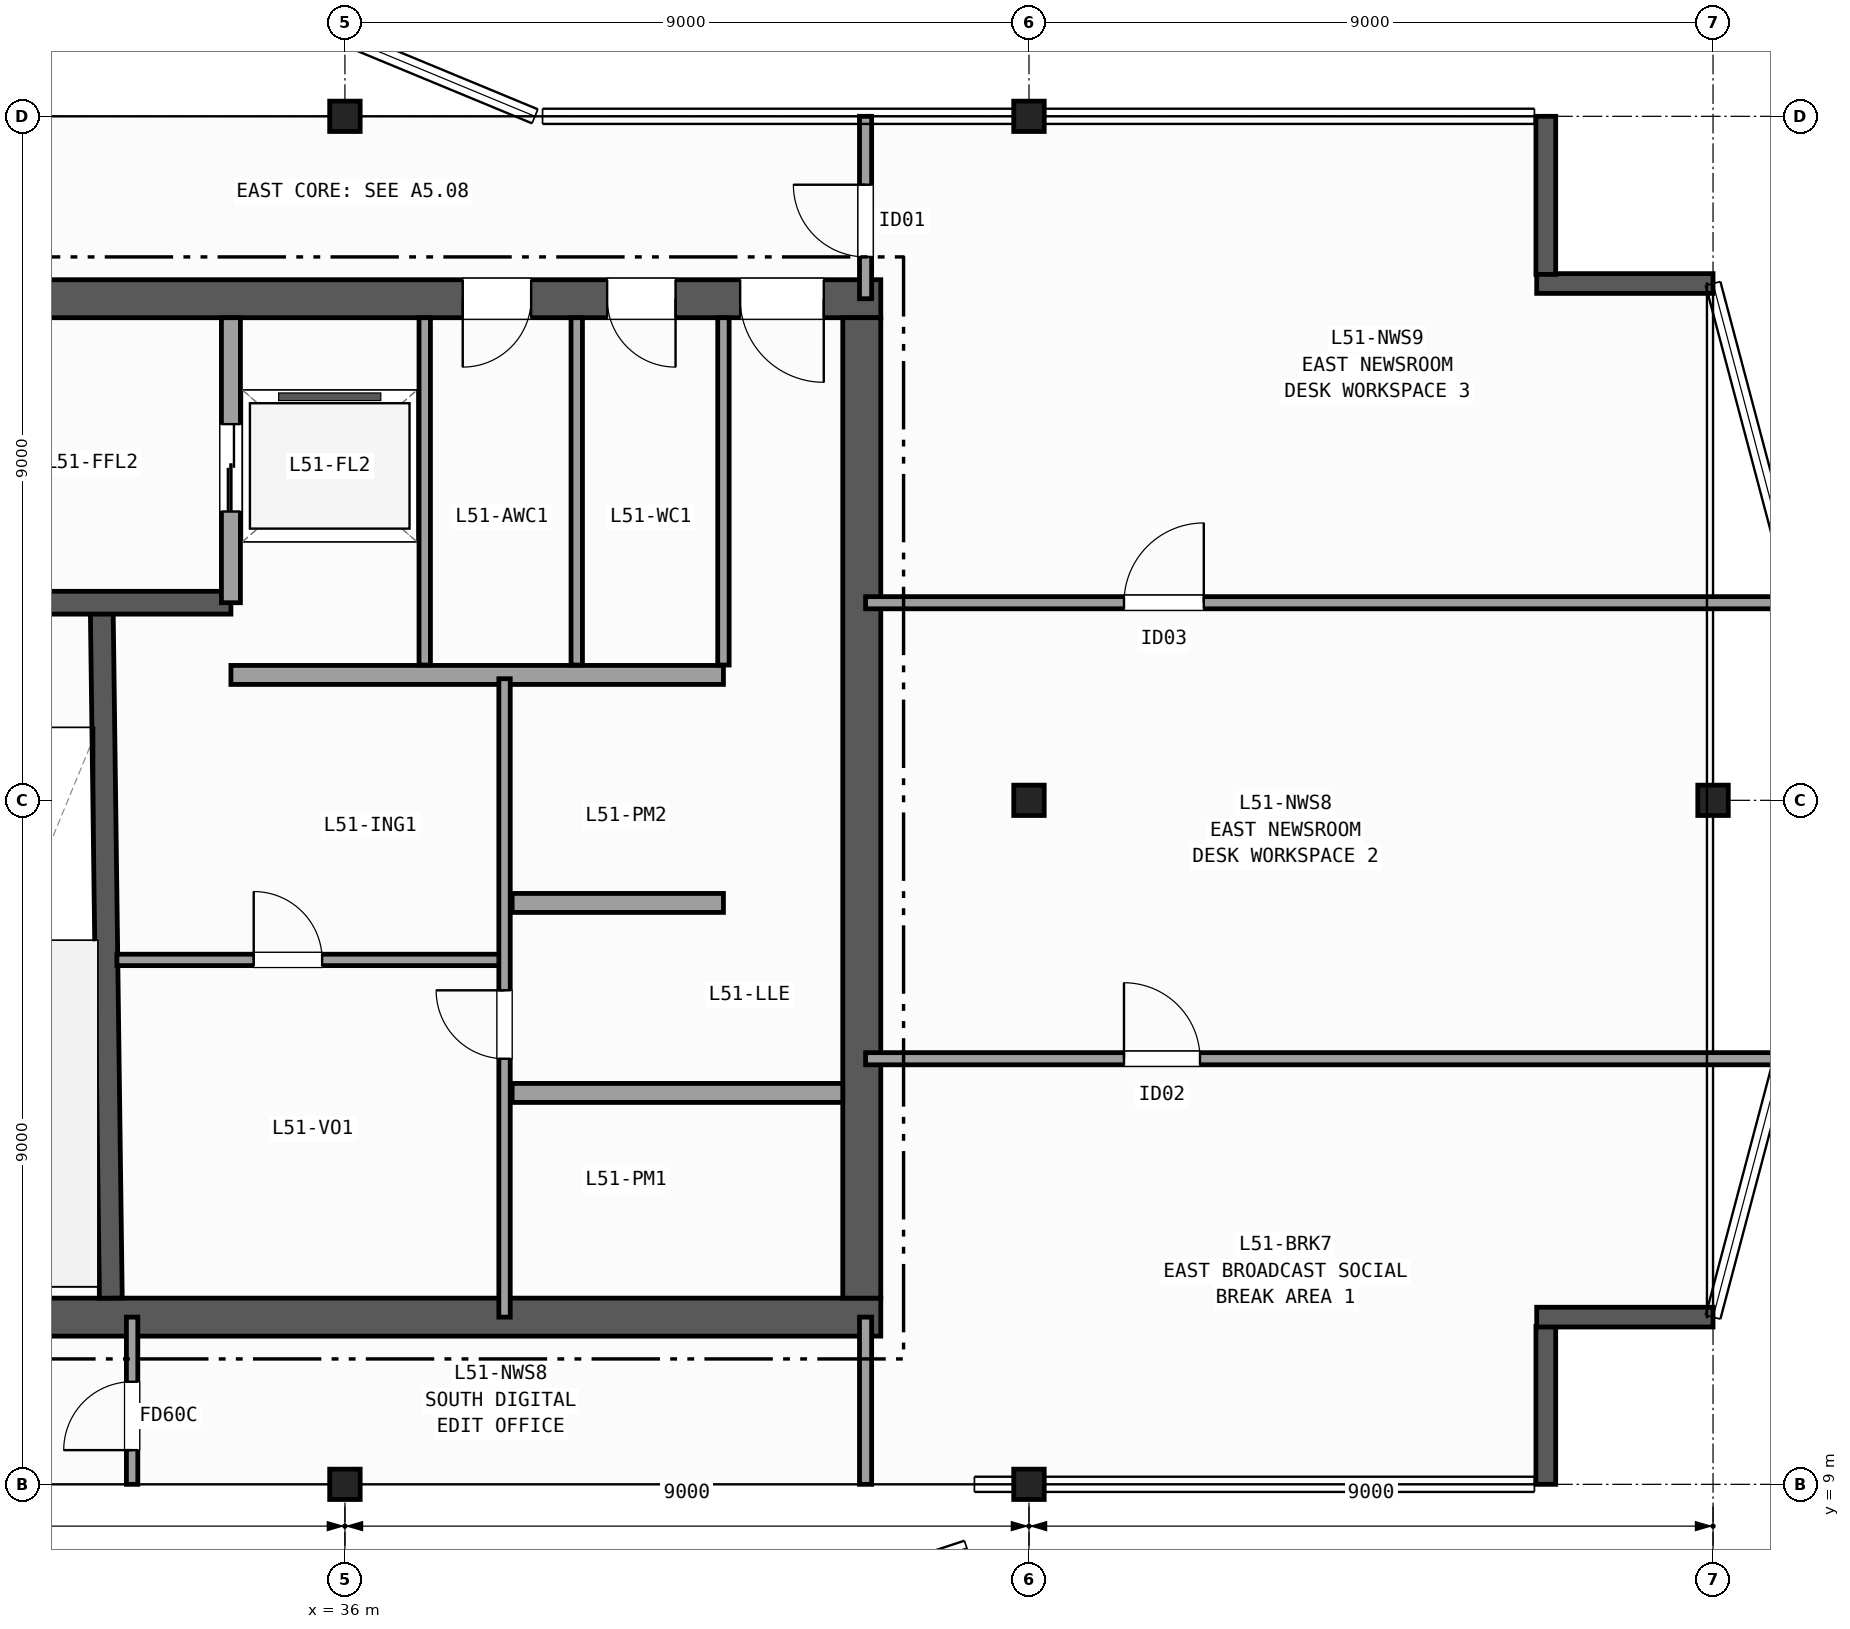
"""IFC4 building model, lengths in metres.
Left out: names, types, materials, properties, quantities, classifications, styles, units other than length and angle.
Written with IfcOpenShell. Run it as: python <this file> out.ifc"""

import sys

from ifc_helpers import new_model, si_unit, direction, frame, frame_2d, origin, origin_2d, place, context, subcontext, project, spatial, rectangle, i_section, extrude, element, fill, save


model = new_model("IFC4")
c1 = context("Model", 3, precision=1e-05, world=origin(), true_north=direction((0.0, 1.0)))
c2 = subcontext(c1, "Body", "Model", "MODEL_VIEW")
j1 = project(units=[si_unit("LENGTHUNIT", "METRE"), si_unit("PLANEANGLEUNIT", "RADIAN")], contexts=[c1])
p1 = place(None, origin())
s1 = spatial("IfcSite", under=j1, at=p1, CompositionType="ELEMENT")
p2 = place(p1, origin())
s2 = spatial("IfcBuilding", under=s1, at=p2, CompositionType="ELEMENT")
p3 = place(p2, frame((0.0, 0.0, 206.2)))
s3 = spatial("IfcBuildingStorey", under=s2, at=p3, CompositionType="ELEMENT", Elevation=206.2)
for number, where, z_axis, x_axis in (
    (1, (36.0, 9.0, 0.0), (0.0, 0.0, 1.0), (1.0, 0.0, 0.0)),
    (2, (36.0, 27.0, 0.0), (0.0, 0.0, 1.0), (1.0, 0.0, 0.0)),
    (3, (45.0, 9.0, 0.0), (0.0, 0.0, 1.0), (1.0, 0.0, 0.0)),
    (4, (45.0, 18.0, 0.0), (0.0, 0.0, 1.0), (1.0, 0.0, 0.0)),
    (5, (45.0, 27.0, 0.0), (0.0, 0.0, 1.0), (1.0, 0.0, 0.0)),
    (6, (54.0, 18.0, 0.0), (0.0, 0.0, 1.0), (1.0, 0.0, 0.0)),
):
    element("IfcColumn", number, at=place(p3, frame(where, z_axis=z_axis, x_axis=x_axis)), inside=s3, PredefinedType="COLUMN", context=c2, shape_type="SweptSolid", body=[
        extrude(i_section(OverallWidth=0.401, OverallDepth=0.399, WebThickness=0.025, FlangeThickness=0.04, FilletRadius=0.015, at=origin_2d()), origin(), (0.0, 0.0, 1.0), 3.7),
    ])
p4 = place(p3, frame((51.8, 9.0, 0.0), z_axis=(0.0, 0.0, 1.0), x_axis=(0.0, 1.0, 0.0)))
e7 = element("IfcWall", 7, at=p4, inside=s3, PredefinedType="SOLIDWALL", context=c2, shape_type="SweptSolid", body=[
    extrude(rectangle(XDim=2.08, YDim=0.26, at=frame_2d((1.04, 0.0))), origin(), (0.0, 0.0, 1.0), 3.42),
])
for number, where, z_axis, x_axis in (
    (8, (51.68, 11.2, 0.0), (0.0, 0.0, 1.0), (1.0, 0.0, 0.0)),
    (9, (54.0, 24.8, 0.0), (0.0, 0.0, 1.0), (-1.0, 0.0, 0.0)),
):
    element("IfcWall", number, at=place(p3, frame(where, z_axis=z_axis, x_axis=x_axis)), inside=s3, PredefinedType="SOLIDWALL", context=c2, shape_type="SweptSolid", body=[
        extrude(rectangle(XDim=2.32, YDim=0.26, at=frame_2d((1.16, 0.0))), origin(), (0.0, 0.0, 1.0), 3.42),
    ])
p5 = place(p3, frame((51.8, 24.92, 0.0), z_axis=(0.0, 0.0, 1.0), x_axis=(0.0, 1.0, 0.0)))
e10 = element("IfcWall", 10, at=p5, inside=s3, PredefinedType="SOLIDWALL", context=c2, shape_type="SweptSolid", body=[
    extrude(rectangle(XDim=2.08, YDim=0.26, at=frame_2d((1.04, 0.0))), origin(), (0.0, 0.0, 1.0), 3.42),
])
p6 = place(p3, frame((29.15, 11.2, 0.0), z_axis=(0.0, 0.0, 1.0), x_axis=(1.0, 0.0, 0.0)))
e11 = element("IfcWall", 11, at=p6, inside=s3, PredefinedType="SHEAR", context=c2, shape_type="SweptSolid", body=[
    extrude(rectangle(XDim=13.9, YDim=0.5, at=frame_2d((6.95, 0.0))), origin(), (0.0, 0.0, 1.0), 3.42),
])
p7 = place(p3, frame((43.05, 24.6, 0.0), z_axis=(0.0, 0.0, 1.0), x_axis=(-1.0, 0.0, 0.0)))
e12 = element("IfcWall", 12, at=p7, inside=s3, PredefinedType="SHEAR", context=c2, shape_type="SweptSolid", body=[
    extrude(rectangle(XDim=13.9, YDim=0.5, at=frame_2d((6.95, 0.0))), origin(), (0.0, 0.0, 1.0), 3.42),
])
p8 = place(p7, frame((0.75, 0.0, 0.0)))
e13 = element("IfcOpeningElement", 13, at=p8, cuts=e12, PredefinedType="OPENING", context=c2, shape_type="SweptSolid", body=[
    extrude(rectangle(XDim=1.1, YDim=2.15, at=frame_2d((0.55, 1.075))), frame((0.0, 0.26, 0.0), z_axis=(0.0, -1.0, 0.0), x_axis=(1.0, 0.0, 0.0)), (0.0, 0.0, 1.0), 0.52),
])
p9 = place(p7, frame((2.7, 0.0, 0.0)))
e14 = element("IfcOpeningElement", 14, at=p9, cuts=e12, PredefinedType="OPENING", context=c2, shape_type="SweptSolid", body=[
    extrude(rectangle(XDim=0.9, YDim=2.1, at=frame_2d((0.45, 1.05))), frame((0.0, 0.26, 0.0), z_axis=(0.0, -1.0, 0.0), x_axis=(1.0, 0.0, 0.0)), (0.0, 0.0, 1.0), 0.52),
])
p10 = place(p7, frame((4.6, 0.0, 0.0)))
e15 = element("IfcOpeningElement", 15, at=p10, cuts=e12, PredefinedType="OPENING", context=c2, shape_type="SweptSolid", body=[
    extrude(rectangle(XDim=0.9, YDim=2.1, at=frame_2d((0.45, 1.05))), frame((0.0, 0.26, 0.0), z_axis=(0.0, -1.0, 0.0), x_axis=(1.0, 0.0, 0.0)), (0.0, 0.0, 1.0), 0.52),
])
p11 = place(p3, frame((42.8, 11.45, 0.0), z_axis=(0.0, 0.0, 1.0), x_axis=(0.0, 1.0, 0.0)))
e16 = element("IfcWall", 16, at=p11, inside=s3, PredefinedType="SHEAR", context=c2, shape_type="SweptSolid", body=[
    extrude(rectangle(XDim=12.9, YDim=0.5, at=frame_2d((6.45, 0.0))), origin(), (0.0, 0.0, 1.0), 3.42),
])
p12 = place(p3, frame((32.92, 11.45, 0.0), z_axis=(0.0, 0.0, 1.0), x_axis=(-0.013171578211, 0.999913251001, 0.0)))
e17 = element("IfcWall", 17, at=p12, inside=s3, PredefinedType="SHEAR", context=c2, shape_type="SweptSolid", body=[
    extrude(rectangle(XDim=9.101, YDim=0.3, at=frame_2d((4.55, 0.0))), origin(), (0.0, 0.0, 1.0), 3.42),
])
p13 = place(p3, frame((34.5, 20.6, 0.0), z_axis=(0.0, 0.0, 1.0), x_axis=(-1.0, 0.0, 0.0)))
e18 = element("IfcWall", 18, at=p13, inside=s3, PredefinedType="SHEAR", context=c2, shape_type="SweptSolid", body=[
    extrude(rectangle(XDim=4.85, YDim=0.3, at=frame_2d((2.425, 0.0))), origin(), (0.0, 0.0, 1.0), 3.42),
])
p14 = place(p13, frame((2.7, 0.0, 0.0)))
e19 = element("IfcOpeningElement", 19, at=p14, cuts=e18, PredefinedType="OPENING", context=c2, shape_type="SweptSolid", body=[
    extrude(rectangle(XDim=1.2, YDim=2.15, at=frame_2d((0.6, 1.075))), frame((0.0, 0.16, 0.0), z_axis=(0.0, -1.0, 0.0), x_axis=(1.0, 0.0, 0.0)), (0.0, 0.0, 1.0), 0.32),
])
p15 = place(p3, frame((34.5, 20.6, 0.0), z_axis=(0.0, 0.0, 1.0), x_axis=(0.0, 1.0, 0.0)))
e20 = element("IfcWall", 20, at=p15, inside=s3, PredefinedType="PARTITIONING", context=c2, shape_type="SweptSolid", body=[
    extrude(rectangle(XDim=3.75, YDim=0.25, at=frame_2d((1.875, 0.0))), origin(), (0.0, 0.0, 1.0), 3.42),
])
p16 = place(p15, frame((1.2, 0.0, 0.0)))
e21 = element("IfcOpeningElement", 21, at=p16, cuts=e20, PredefinedType="OPENING", context=c2, shape_type="SweptSolid", body=[
    extrude(rectangle(XDim=1.15, YDim=2.15, at=frame_2d((0.575, 1.075))), frame((0.0, 0.135, 0.0), z_axis=(0.0, -1.0, 0.0), x_axis=(1.0, 0.0, 0.0)), (0.0, 0.0, 1.0), 0.27),
])
p17 = place(p3, frame((34.5, 19.65, 0.0), z_axis=(0.0, 0.0, 1.0), x_axis=(1.0, 0.0, 0.0)))
e22 = element("IfcWall", 22, at=p17, inside=s3, PredefinedType="PARTITIONING", context=c2, shape_type="SweptSolid", body=[
    extrude(rectangle(XDim=6.48, YDim=0.25, at=frame_2d((3.24, 0.0))), origin(), (0.0, 0.0, 1.0), 3.42),
])
p18 = place(p3, frame((38.2, 14.15, 0.0), z_axis=(0.0, 0.0, 1.0), x_axis=(1.0, 0.0, 0.0)))
e23 = element("IfcWall", 23, at=p18, inside=s3, PredefinedType="PARTITIONING", context=c2, shape_type="SweptSolid", body=[
    extrude(rectangle(XDim=4.35, YDim=0.25, at=frame_2d((2.175, 0.0))), origin(), (0.0, 0.0, 1.0), 3.42),
])
p19 = place(p3, frame((40.98, 16.65, 0.0), z_axis=(0.0, 0.0, 1.0), x_axis=(-1.0, 0.0, 0.0)))
e24 = element("IfcWall", 24, at=p19, inside=s3, PredefinedType="PARTITIONING", context=c2, shape_type="SweptSolid", body=[
    extrude(rectangle(XDim=2.78, YDim=0.25, at=frame_2d((1.39, 0.0))), origin(), (0.0, 0.0, 1.0), 3.42),
])
p20 = place(p3, frame((33.0, 15.9, 0.0), z_axis=(0.0, 0.0, 1.0), x_axis=(1.0, 0.0, 0.0)))
e25 = element("IfcWall", 25, at=p20, inside=s3, PredefinedType="PARTITIONING", context=c2, shape_type="SweptSolid", body=[
    extrude(rectangle(XDim=5.1, YDim=0.15, at=frame_2d((2.55, 0.0))), origin(), (0.0, 0.0, 1.0), 3.42),
])
p21 = place(p20, frame((1.8, 0.0, 0.0)))
e26 = element("IfcOpeningElement", 26, at=p21, cuts=e25, PredefinedType="OPENING", context=c2, shape_type="SweptSolid", body=[
    extrude(rectangle(XDim=0.9, YDim=2.1, at=frame_2d((0.45, 1.05))), frame((0.0, 0.085, 0.0), z_axis=(0.0, -1.0, 0.0), x_axis=(1.0, 0.0, 0.0)), (0.0, 0.0, 1.0), 0.17),
])
p22 = place(p3, frame((38.1, 11.2, 0.0), z_axis=(0.0, 0.0, 1.0), x_axis=(0.0, 1.0, 0.0)))
e27 = element("IfcWall", 27, at=p22, inside=s3, PredefinedType="PARTITIONING", context=c2, shape_type="SweptSolid", body=[
    extrude(rectangle(XDim=8.4, YDim=0.15, at=frame_2d((4.2, 0.0))), origin(), (0.0, 0.0, 1.0), 3.42),
])
p23 = place(p22, frame((3.4, 0.0, 0.0)))
e28 = element("IfcOpeningElement", 28, at=p23, cuts=e27, PredefinedType="OPENING", context=c2, shape_type="SweptSolid", body=[
    extrude(rectangle(XDim=0.9, YDim=2.1, at=frame_2d((0.45, 1.05))), frame((0.0, 0.085, 0.0), z_axis=(0.0, -1.0, 0.0), x_axis=(1.0, 0.0, 0.0)), (0.0, 0.0, 1.0), 0.17),
])
for number, where, z_axis, x_axis in (
    (29, (37.05, 19.78, 0.0), (0.0, 0.0, 1.0), (0.0, 1.0, 0.0)),
    (30, (39.05, 19.78, 0.0), (0.0, 0.0, 1.0), (0.0, 1.0, 0.0)),
    (31, (40.98, 19.78, 0.0), (0.0, 0.0, 1.0), (0.0, 1.0, 0.0)),
):
    element("IfcWall", number, at=place(p3, frame(where, z_axis=z_axis, x_axis=x_axis)), inside=s3, PredefinedType="PARTITIONING", context=c2, shape_type="SweptSolid", body=[
        extrude(rectangle(XDim=4.57, YDim=0.15, at=frame_2d((2.285, 0.0))), origin(), (0.0, 0.0, 1.0), 3.42),
    ])
p24 = place(p3, frame((33.2, 9.0, 0.0), z_axis=(0.0, 0.0, 1.0), x_axis=(0.0, 1.0, 0.0)))
e32 = element("IfcWall", 32, at=p24, inside=s3, PredefinedType="PARTITIONING", context=c2, shape_type="SweptSolid", body=[
    extrude(rectangle(XDim=2.2, YDim=0.15, at=frame_2d((1.1, 0.0))), origin(), (0.0, 0.0, 1.0), 2.707),
])
p25 = place(p24, frame((0.45, 0.0, 0.0)))
e33 = element("IfcOpeningElement", 33, at=p25, cuts=e32, PredefinedType="OPENING", context=c2, shape_type="SweptSolid", body=[
    extrude(rectangle(XDim=0.9, YDim=2.1, at=frame_2d((0.45, 1.05))), frame((0.0, 0.085, 0.0), z_axis=(0.0, -1.0, 0.0), x_axis=(1.0, 0.0, 0.0)), (0.0, 0.0, 1.0), 0.17),
])
p26 = place(p3, frame((42.85, 9.0, 0.0), z_axis=(0.0, 0.0, 1.0), x_axis=(0.0, 1.0, 0.0)))
e34 = element("IfcWall", 34, at=p26, inside=s3, PredefinedType="PARTITIONING", context=c2, shape_type="SweptSolid", body=[
    extrude(rectangle(XDim=2.2, YDim=0.16, at=frame_2d((1.1, 0.0))), origin(), (0.0, 0.0, 1.0), 2.707),
])
p27 = place(p3, frame((42.85, 24.6, 0.0), z_axis=(0.0, 0.0, 1.0), x_axis=(0.0, 1.0, 0.0)))
e35 = element("IfcWall", 35, at=p27, inside=s3, PredefinedType="PARTITIONING", context=c2, shape_type="SweptSolid", body=[
    extrude(rectangle(XDim=2.4, YDim=0.16, at=frame_2d((1.2, 0.0))), origin(), (0.0, 0.0, 1.0), 2.707),
])
p28 = place(p27, frame((0.55, 0.0, 0.0)))
e36 = element("IfcOpeningElement", 36, at=p28, cuts=e35, PredefinedType="OPENING", context=c2, shape_type="SweptSolid", body=[
    extrude(rectangle(XDim=0.95, YDim=2.1, at=frame_2d((0.475, 1.05))), frame((0.0, 0.09, 0.0), z_axis=(0.0, -1.0, 0.0), x_axis=(1.0, 0.0, 0.0)), (0.0, 0.0, 1.0), 0.18),
])
p29 = place(p3, frame((42.85, 14.6, 0.0), z_axis=(0.0, 0.0, 1.0), x_axis=(1.0, 0.0, 0.0)))
e37 = element("IfcWall", 37, at=p29, inside=s3, PredefinedType="PARTITIONING", context=c2, shape_type="SweptSolid", body=[
    extrude(rectangle(XDim=12.05, YDim=0.16, at=frame_2d((6.025, 0.0))), origin(), (0.0, 0.0, 1.0), 3.42),
])
p30 = place(p29, frame((3.4, 0.0, 0.0)))
e38 = element("IfcOpeningElement", 38, at=p30, cuts=e37, PredefinedType="OPENING", context=c2, shape_type="SweptSolid", body=[
    extrude(rectangle(XDim=1.0, YDim=2.1, at=frame_2d((0.5, 1.05))), frame((0.0, 0.09, 0.0), z_axis=(0.0, -1.0, 0.0), x_axis=(1.0, 0.0, 0.0)), (0.0, 0.0, 1.0), 0.18),
])
p31 = place(p3, frame((42.85, 20.6, 0.0), z_axis=(0.0, 0.0, 1.0), x_axis=(1.0, 0.0, 0.0)))
e39 = element("IfcWall", 39, at=p31, inside=s3, PredefinedType="PARTITIONING", context=c2, shape_type="SweptSolid", body=[
    extrude(rectangle(XDim=12.262, YDim=0.16, at=frame_2d((6.131, 0.0))), origin(), (0.0, 0.0, 1.0), 3.42),
])
p32 = place(p31, frame((3.4, 0.0, 0.0)))
e40 = element("IfcOpeningElement", 40, at=p32, cuts=e39, PredefinedType="OPENING", context=c2, shape_type="SweptSolid", body=[
    extrude(rectangle(XDim=1.05, YDim=2.15, at=frame_2d((0.525, 1.075))), frame((0.0, 0.09, 0.0), z_axis=(0.0, -1.0, 0.0), x_axis=(1.0, 0.0, 0.0)), (0.0, 0.0, 1.0), 0.18),
])
p33 = place(p8, origin())
e41 = element("IfcDoor", 41, at=p33, inside=s3, OperationType="SINGLE_SWING_LEFT", PredefinedType="DOOR", context=c2, shape_type="SweptSolid", body=[
    extrude(rectangle(XDim=1.1, YDim=2.15, at=frame_2d((0.55, 1.075))), frame((0.0, 0.025, 0.0), z_axis=(0.0, -1.0, 0.0), x_axis=(1.0, 0.0, 0.0)), (0.0, 0.0, 1.0), 0.05),
])
fill(e13, e41)
p34 = place(p9, origin())
e42 = element("IfcDoor", 42, at=p34, inside=s3, OperationType="SINGLE_SWING_LEFT", PredefinedType="DOOR", context=c2, shape_type="SweptSolid", body=[
    extrude(rectangle(XDim=0.9, YDim=2.1, at=frame_2d((0.45, 1.05))), frame((0.0, 0.025, 0.0), z_axis=(0.0, -1.0, 0.0), x_axis=(1.0, 0.0, 0.0)), (0.0, 0.0, 1.0), 0.05),
])
fill(e14, e42)
p35 = place(p10, origin())
e43 = element("IfcDoor", 43, at=p35, inside=s3, OperationType="SINGLE_SWING_RIGHT", PredefinedType="DOOR", context=c2, shape_type="SweptSolid", body=[
    extrude(rectangle(XDim=0.9, YDim=2.1, at=frame_2d((0.45, 1.05))), frame((0.0, 0.025, 0.0), z_axis=(0.0, -1.0, 0.0), x_axis=(1.0, 0.0, 0.0)), (0.0, 0.0, 1.0), 0.05),
])
fill(e15, e43)
p36 = place(p16, origin())
e44 = element("IfcDoor", 44, at=p36, inside=s3, OperationType="DOUBLE_DOOR_SLIDING", PredefinedType="DOOR", context=c2, shape_type="SweptSolid", body=[
    extrude(rectangle(XDim=1.15, YDim=2.15, at=frame_2d((0.575, 1.075))), frame((0.0, 0.025, 0.0), z_axis=(0.0, -1.0, 0.0), x_axis=(1.0, 0.0, 0.0)), (0.0, 0.0, 1.0), 0.05),
])
fill(e21, e44)
p37 = place(p23, origin())
e45 = element("IfcDoor", 45, at=p37, inside=s3, OperationType="SINGLE_SWING_RIGHT", PredefinedType="DOOR", context=c2, shape_type="SweptSolid", body=[
    extrude(rectangle(XDim=0.9, YDim=2.1, at=frame_2d((0.45, 1.05))), frame((0.0, 0.025, 0.0), z_axis=(0.0, -1.0, 0.0), x_axis=(1.0, 0.0, 0.0)), (0.0, 0.0, 1.0), 0.05),
])
fill(e28, e45)
p38 = place(p21, origin())
e46 = element("IfcDoor", 46, at=p38, inside=s3, OperationType="SINGLE_SWING_LEFT", PredefinedType="DOOR", context=c2, shape_type="SweptSolid", body=[
    extrude(rectangle(XDim=0.9, YDim=2.1, at=frame_2d((0.45, 1.05))), frame((0.0, 0.025, 0.0), z_axis=(0.0, -1.0, 0.0), x_axis=(1.0, 0.0, 0.0)), (0.0, 0.0, 1.0), 0.05),
])
fill(e26, e46)
p39 = place(p25, origin())
e47 = element("IfcDoor", 47, at=p39, inside=s3, OperationType="SINGLE_SWING_LEFT", PredefinedType="DOOR", context=c2, shape_type="SweptSolid", body=[
    extrude(rectangle(XDim=0.9, YDim=2.1, at=frame_2d((0.45, 1.05))), frame((0.0, 0.025, 0.0), z_axis=(0.0, -1.0, 0.0), x_axis=(1.0, 0.0, 0.0)), (0.0, 0.0, 1.0), 0.05),
])
fill(e33, e47)
p40 = place(p28, origin())
e48 = element("IfcDoor", 48, at=p40, inside=s3, OperationType="SINGLE_SWING_RIGHT", PredefinedType="DOOR", context=c2, shape_type="SweptSolid", body=[
    extrude(rectangle(XDim=0.95, YDim=2.1, at=frame_2d((0.475, 1.05))), frame((0.0, 0.025, 0.0), z_axis=(0.0, -1.0, 0.0), x_axis=(1.0, 0.0, 0.0)), (0.0, 0.0, 1.0), 0.05),
])
fill(e36, e48)
p41 = place(p30, origin())
e49 = element("IfcDoor", 49, at=p41, inside=s3, OperationType="SINGLE_SWING_LEFT", PredefinedType="DOOR", context=c2, shape_type="SweptSolid", body=[
    extrude(rectangle(XDim=1.0, YDim=2.1, at=frame_2d((0.5, 1.05))), frame((0.0, 0.025, 0.0), z_axis=(0.0, -1.0, 0.0), x_axis=(1.0, 0.0, 0.0)), (0.0, 0.0, 1.0), 0.05),
])
fill(e38, e49)
p42 = place(p32, origin())
e50 = element("IfcDoor", 50, at=p42, inside=s3, OperationType="SINGLE_SWING_RIGHT", PredefinedType="DOOR", context=c2, shape_type="SweptSolid", body=[
    extrude(rectangle(XDim=1.05, YDim=2.15, at=frame_2d((0.525, 1.075))), frame((0.0, 0.025, 0.0), z_axis=(0.0, -1.0, 0.0), x_axis=(1.0, 0.0, 0.0)), (0.0, 0.0, 1.0), 0.05),
])
fill(e40, e50)
save(model, sys.argv[1])
